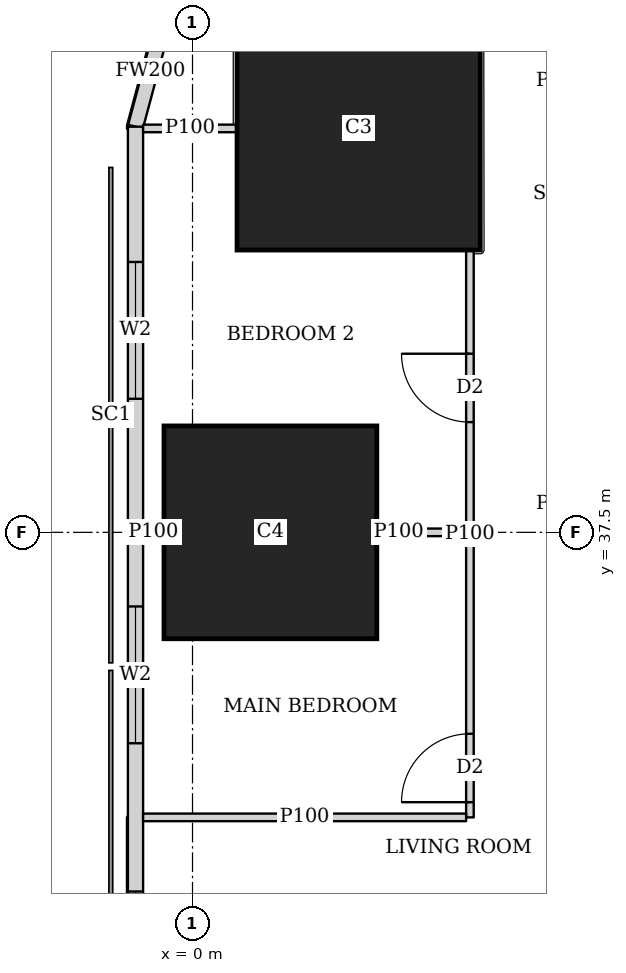
"""IFC4 building model, lengths in metres.
Left out: names, types, materials, properties, quantities, classifications, styles, units other than length and angle.
Written with IfcOpenShell. Run it as: python <this file> out.ifc"""

import sys

from ifc_helpers import new_model, si_unit, direction, frame, frame_2d, origin, origin_2d, place, context, subcontext, project, spatial, rectangle, extrude, element, fill, save


model = new_model("IFC4")
c1 = context("Model", 3, precision=1e-05, world=origin(), true_north=direction((0.0, 1.0)))
c2 = subcontext(c1, "Body", "Model", "MODEL_VIEW")
j1 = project(units=[si_unit("LENGTHUNIT", "METRE"), si_unit("PLANEANGLEUNIT", "RADIAN")], contexts=[c1])
p1 = place(None, origin())
s1 = spatial("IfcSite", under=j1, at=p1, CompositionType="ELEMENT")
p2 = place(p1, origin())
s2 = spatial("IfcBuilding", under=s1, at=p2, CompositionType="ELEMENT")
p3 = place(p2, frame((0.0, 0.0, 31.25)))
s3 = spatial("IfcBuildingStorey", under=s2, at=p3, CompositionType="ELEMENT", Elevation=31.25)
p4 = place(p3, frame((1.025, 37.5, 0.0), z_axis=(0.0, 0.0, 1.0), x_axis=(1.0, 0.0, 0.0)))
e1 = element("IfcColumn", 1, at=p4, inside=s3, PredefinedType="COLUMN", context=c2, shape_type="SweptSolid", body=[
    extrude(rectangle(XDim=2.8, YDim=2.8, at=origin_2d()), origin(), (0.0, 0.0, 1.0), 3.75),
])
p5 = place(p3, frame((2.186, 42.814, 0.0), z_axis=(0.0, 0.0, 1.0), x_axis=(1.0, 0.0, 0.0)))
e2 = element("IfcColumn", 2, at=p5, inside=s3, PredefinedType="COLUMN", context=c2, shape_type="SweptSolid", body=[
    extrude(rectangle(XDim=3.2, YDim=3.2, at=origin_2d()), origin(), (0.0, 0.0, 1.0), 3.75),
])
p6 = place(p3, frame((-0.358, 44.298, 0.0), z_axis=(0.0, 0.0, 1.0), x_axis=(-0.259168954497, -0.965832000415, 0.0)))
e3 = element("IfcWall", 3, at=p6, inside=s3, PredefinedType="SOLIDWALL", context=c2, shape_type="SweptSolid", body=[
    extrude(rectangle(XDim=1.513, YDim=0.2, at=frame_2d((0.756, 0.0))), origin(), (0.0, 0.0, 1.0), 3.5),
])
p7 = place(p3, frame((-0.75, 42.837, 0.0), z_axis=(0.0, 0.0, 1.0), x_axis=(0.0, -1.0, 0.0)))
e4 = element("IfcWall", 4, at=p7, inside=s3, PredefinedType="SOLIDWALL", context=c2, shape_type="SweptSolid", body=[
    extrude(rectangle(XDim=40.674, YDim=0.2, at=frame_2d((20.337, 0.0))), origin(), (0.0, 0.0, 1.0), 3.5),
])
p8 = place(p7, frame((1.78, 0.0, 0.9)))
e5 = element("IfcOpeningElement", 5, at=p8, cuts=e4, PredefinedType="OPENING", context=c2, shape_type="SweptSolid", body=[
    extrude(rectangle(XDim=1.8, YDim=1.5, at=frame_2d((0.9, 0.75))), frame((0.0, 0.11, 0.0), z_axis=(0.0, -1.0, 0.0), x_axis=(1.0, 0.0, 0.0)), (0.0, 0.0, 1.0), 0.22),
])
p9 = place(p7, frame((6.312, 0.0, 0.9)))
e6 = element("IfcOpeningElement", 6, at=p9, cuts=e4, PredefinedType="OPENING", context=c2, shape_type="SweptSolid", body=[
    extrude(rectangle(XDim=1.8, YDim=1.5, at=frame_2d((0.9, 0.75))), frame((0.0, 0.11, 0.0), z_axis=(0.0, -1.0, 0.0), x_axis=(1.0, 0.0, 0.0)), (0.0, 0.0, 1.0), 0.22),
])
p10 = place(p7, frame((10.062, 0.0, 0.9)))
e7 = element("IfcOpeningElement", 7, at=p10, cuts=e4, PredefinedType="OPENING", context=c2, shape_type="SweptSolid", body=[
    extrude(rectangle(XDim=1.8, YDim=1.5, at=frame_2d((0.9, 0.75))), frame((0.0, 0.11, 0.0), z_axis=(0.0, -1.0, 0.0), x_axis=(1.0, 0.0, 0.0)), (0.0, 0.0, 1.0), 0.22),
])
p11 = place(p7, frame((13.812, 0.0, 0.9)))
e8 = element("IfcOpeningElement", 8, at=p11, cuts=e4, PredefinedType="OPENING", context=c2, shape_type="SweptSolid", body=[
    extrude(rectangle(XDim=1.8, YDim=1.5, at=frame_2d((0.9, 0.75))), frame((0.0, 0.11, 0.0), z_axis=(0.0, -1.0, 0.0), x_axis=(1.0, 0.0, 0.0)), (0.0, 0.0, 1.0), 0.22),
])
p12 = place(p7, frame((17.562, 0.0, 0.9)))
e9 = element("IfcOpeningElement", 9, at=p12, cuts=e4, PredefinedType="OPENING", context=c2, shape_type="SweptSolid", body=[
    extrude(rectangle(XDim=1.8, YDim=1.5, at=frame_2d((0.9, 0.75))), frame((0.0, 0.11, 0.0), z_axis=(0.0, -1.0, 0.0), x_axis=(1.0, 0.0, 0.0)), (0.0, 0.0, 1.0), 0.22),
])
p13 = place(p7, frame((21.312, 0.0, 0.9)))
e10 = element("IfcOpeningElement", 10, at=p13, cuts=e4, PredefinedType="OPENING", context=c2, shape_type="SweptSolid", body=[
    extrude(rectangle(XDim=1.8, YDim=1.5, at=frame_2d((0.9, 0.75))), frame((0.0, 0.11, 0.0), z_axis=(0.0, -1.0, 0.0), x_axis=(1.0, 0.0, 0.0)), (0.0, 0.0, 1.0), 0.22),
])
p14 = place(p7, frame((25.062, 0.0, 0.9)))
e11 = element("IfcOpeningElement", 11, at=p14, cuts=e4, PredefinedType="OPENING", context=c2, shape_type="SweptSolid", body=[
    extrude(rectangle(XDim=1.8, YDim=1.5, at=frame_2d((0.9, 0.75))), frame((0.0, 0.11, 0.0), z_axis=(0.0, -1.0, 0.0), x_axis=(1.0, 0.0, 0.0)), (0.0, 0.0, 1.0), 0.22),
])
p15 = place(p7, frame((28.812, 0.0, 0.9)))
e12 = element("IfcOpeningElement", 12, at=p15, cuts=e4, PredefinedType="OPENING", context=c2, shape_type="SweptSolid", body=[
    extrude(rectangle(XDim=1.8, YDim=1.5, at=frame_2d((0.9, 0.75))), frame((0.0, 0.11, 0.0), z_axis=(0.0, -1.0, 0.0), x_axis=(1.0, 0.0, 0.0)), (0.0, 0.0, 1.0), 0.22),
])
p16 = place(p7, frame((32.562, 0.0, 0.9)))
e13 = element("IfcOpeningElement", 13, at=p16, cuts=e4, PredefinedType="OPENING", context=c2, shape_type="SweptSolid", body=[
    extrude(rectangle(XDim=1.8, YDim=1.5, at=frame_2d((0.9, 0.75))), frame((0.0, 0.11, 0.0), z_axis=(0.0, -1.0, 0.0), x_axis=(1.0, 0.0, 0.0)), (0.0, 0.0, 1.0), 0.22),
])
p17 = place(p7, frame((37.094, 0.0, 0.9)))
e14 = element("IfcOpeningElement", 14, at=p17, cuts=e4, PredefinedType="OPENING", context=c2, shape_type="SweptSolid", body=[
    extrude(rectangle(XDim=1.8, YDim=1.5, at=frame_2d((0.9, 0.75))), frame((0.0, 0.11, 0.0), z_axis=(0.0, -1.0, 0.0), x_axis=(1.0, 0.0, 0.0)), (0.0, 0.0, 1.0), 0.22),
])
p18 = place(p3, frame((3.65, 33.75, 0.0), z_axis=(0.0, 0.0, 1.0), x_axis=(0.0, 1.0, 0.0)))
e15 = element("IfcWall", 15, at=p18, inside=s3, PredefinedType="PARTITIONING", context=c2, shape_type="SweptSolid", body=[
    extrude(rectangle(XDim=7.463, YDim=0.1, at=frame_2d((3.731, 0.0))), origin(), (0.0, 0.0, 1.0), 3.5),
])
p19 = place(p18, frame((0.2, 0.0, 0.0)))
e16 = element("IfcOpeningElement", 16, at=p19, cuts=e15, PredefinedType="OPENING", context=c2, shape_type="SweptSolid", body=[
    extrude(rectangle(XDim=0.9, YDim=2.1, at=frame_2d((0.45, 1.05))), frame((0.0, 0.06, 0.0), z_axis=(0.0, -1.0, 0.0), x_axis=(1.0, 0.0, 0.0)), (0.0, 0.0, 1.0), 0.12),
])
p20 = place(p18, frame((5.2, 0.0, 0.0)))
e17 = element("IfcOpeningElement", 17, at=p20, cuts=e15, PredefinedType="OPENING", context=c2, shape_type="SweptSolid", body=[
    extrude(rectangle(XDim=0.9, YDim=2.1, at=frame_2d((0.45, 1.05))), frame((0.0, 0.06, 0.0), z_axis=(0.0, -1.0, 0.0), x_axis=(1.0, 0.0, 0.0)), (0.0, 0.0, 1.0), 0.12),
])
p21 = place(p3, frame((-0.65, 33.75, 0.0), z_axis=(0.0, 0.0, 1.0), x_axis=(1.0, 0.0, 0.0)))
e18 = element("IfcWall", 18, at=p21, inside=s3, PredefinedType="PARTITIONING", context=c2, shape_type="SweptSolid", body=[
    extrude(rectangle(XDim=4.25, YDim=0.1, at=frame_2d((2.125, 0.0))), origin(), (0.0, 0.0, 1.0), 2.05),
])
p22 = place(p3, frame((-0.65, 37.5, 0.0), z_axis=(0.0, 0.0, 1.0), x_axis=(1.0, 0.0, 0.0)))
e19 = element("IfcWall", 19, at=p22, inside=s3, PredefinedType="PARTITIONING", context=c2, shape_type="SweptSolid", body=[
    extrude(rectangle(XDim=0.274, YDim=0.1, at=frame_2d((0.137, 0.0))), origin(), (0.0, 0.0, 1.0), 3.5),
])
p23 = place(p3, frame((2.426, 37.5, 0.0), z_axis=(0.0, 0.0, 1.0), x_axis=(1.0, 0.0, 0.0)))
e20 = element("IfcWall", 20, at=p23, inside=s3, PredefinedType="PARTITIONING", context=c2, shape_type="SweptSolid", body=[
    extrude(rectangle(XDim=1.174, YDim=0.1, at=frame_2d((0.587, 0.0))), origin(), (0.0, 0.0, 1.0), 2.05),
])
p24 = place(p3, frame((-0.65, 42.814, 0.0), z_axis=(0.0, 0.0, 1.0), x_axis=(1.0, 0.0, 0.0)))
e21 = element("IfcWall", 21, at=p24, inside=s3, PredefinedType="PARTITIONING", context=c2, shape_type="SweptSolid", body=[
    extrude(rectangle(XDim=1.235, YDim=0.1, at=frame_2d((0.617, 0.0))), origin(), (0.0, 0.0, 1.0), 3.5),
])
p25 = place(p8, origin())
e22 = element("IfcWindow", 22, at=p25, inside=s3, PartitioningType="SINGLE_PANEL", PredefinedType="WINDOW", context=c2, shape_type="SweptSolid", body=[
    extrude(rectangle(XDim=1.8, YDim=1.5, at=frame_2d((0.9, 0.75))), frame((0.0, 0.03, 0.0), z_axis=(0.0, -1.0, 0.0), x_axis=(1.0, 0.0, 0.0)), (0.0, 0.0, 1.0), 0.06),
])
fill(e5, e22)
p26 = place(p9, origin())
e23 = element("IfcWindow", 23, at=p26, inside=s3, PartitioningType="SINGLE_PANEL", PredefinedType="WINDOW", context=c2, shape_type="SweptSolid", body=[
    extrude(rectangle(XDim=1.8, YDim=1.5, at=frame_2d((0.9, 0.75))), frame((0.0, 0.03, 0.0), z_axis=(0.0, -1.0, 0.0), x_axis=(1.0, 0.0, 0.0)), (0.0, 0.0, 1.0), 0.06),
])
fill(e6, e23)
p27 = place(p10, origin())
e24 = element("IfcWindow", 24, at=p27, inside=s3, PartitioningType="SINGLE_PANEL", PredefinedType="WINDOW", context=c2, shape_type="SweptSolid", body=[
    extrude(rectangle(XDim=1.8, YDim=1.5, at=frame_2d((0.9, 0.75))), frame((0.0, 0.03, 0.0), z_axis=(0.0, -1.0, 0.0), x_axis=(1.0, 0.0, 0.0)), (0.0, 0.0, 1.0), 0.06),
])
fill(e7, e24)
p28 = place(p19, origin())
e25 = element("IfcDoor", 25, at=p28, inside=s3, OperationType="SINGLE_SWING_LEFT", PredefinedType="DOOR", context=c2, shape_type="SweptSolid", body=[
    extrude(rectangle(XDim=0.9, YDim=2.1, at=frame_2d((0.45, 1.05))), frame((0.0, 0.025, 0.0), z_axis=(0.0, -1.0, 0.0), x_axis=(1.0, 0.0, 0.0)), (0.0, 0.0, 1.0), 0.05),
])
fill(e16, e25)
p29 = place(p20, origin())
e26 = element("IfcDoor", 26, at=p29, inside=s3, OperationType="SINGLE_SWING_RIGHT", PredefinedType="DOOR", context=c2, shape_type="SweptSolid", body=[
    extrude(rectangle(XDim=0.9, YDim=2.1, at=frame_2d((0.45, 1.05))), frame((0.0, 0.025, 0.0), z_axis=(0.0, -1.0, 0.0), x_axis=(1.0, 0.0, 0.0)), (0.0, 0.0, 1.0), 0.05),
])
fill(e17, e26)
save(model, sys.argv[1])
